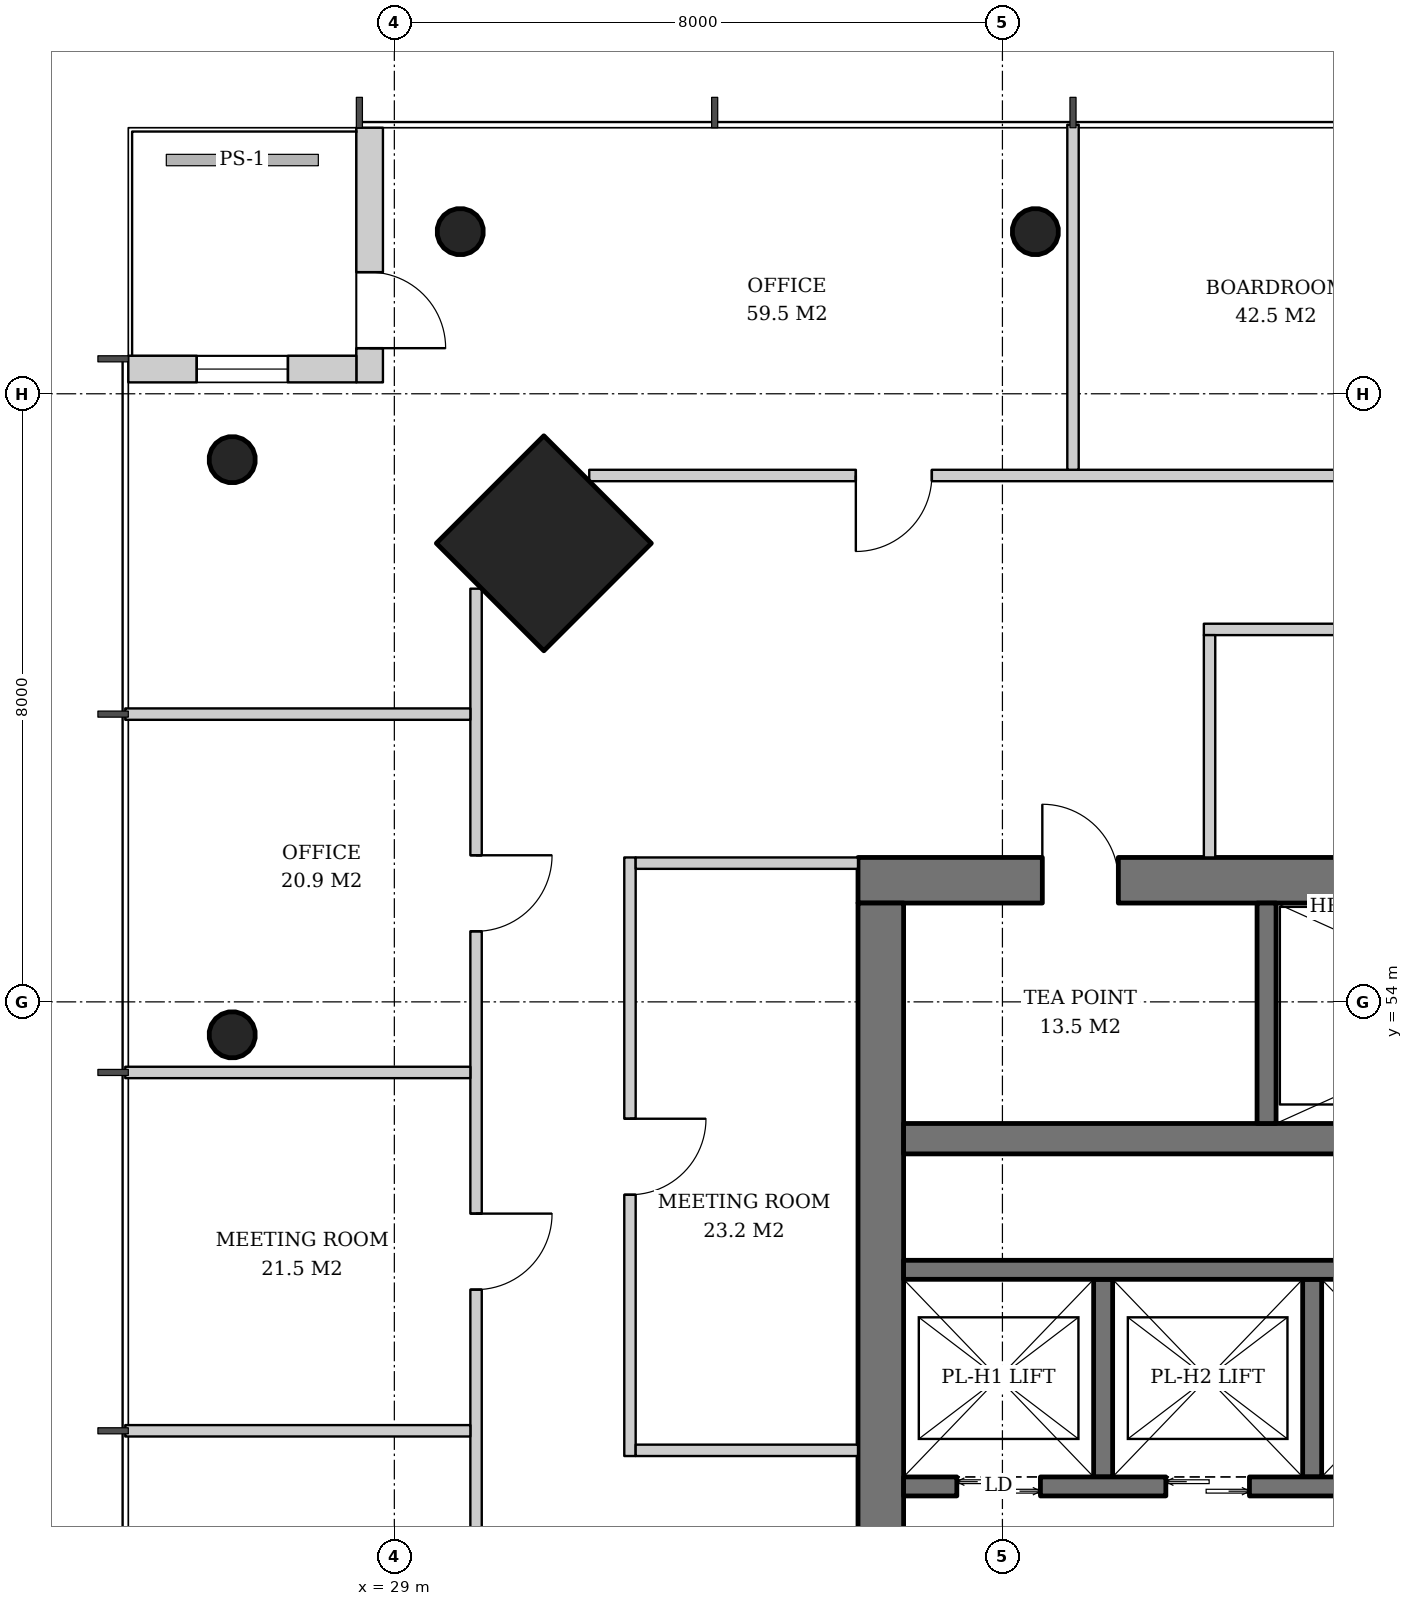
"""IFC4 building model, lengths in metres.
Left out: names, types, materials, properties, quantities, classifications, styles, units other than length and angle.
Written with IfcOpenShell. Run it as: python <this file> out.ifc"""

import sys

from ifc_helpers import new_model, si_unit, direction, frame, frame_2d, origin, origin_2d, place, context, subcontext, project, spatial, rectangle, hollow_circle, extrude, element, fill, save


model = new_model("IFC4")
c1 = context("Model", 3, precision=1e-05, world=origin(), true_north=direction((0.0, 1.0)))
c2 = subcontext(c1, "Body", "Model", "MODEL_VIEW")
j1 = project(units=[si_unit("LENGTHUNIT", "METRE"), si_unit("PLANEANGLEUNIT", "RADIAN")], contexts=[c1])
p1 = place(None, origin())
s1 = spatial("IfcSite", under=j1, at=p1, CompositionType="ELEMENT")
p2 = place(p1, origin())
s2 = spatial("IfcBuilding", under=s1, at=p2, CompositionType="ELEMENT")
p3 = place(p2, frame((0.0, 0.0, 203.4)))
s3 = spatial("IfcBuildingStorey", under=s2, at=p3, CompositionType="ELEMENT", Elevation=203.4)
p4 = place(p3, frame((30.928, 60.072, 0.0), z_axis=(0.031962158256, -0.031962158256, 0.998977898093), x_axis=(0.707106781187, 0.707106781187, 0.0)))
e1 = element("IfcColumn", 1, at=p4, inside=s3, PredefinedType="COLUMN", context=c2, shape_type="SweptSolid", body=[
    extrude(rectangle(XDim=2.0, YDim=2.0, at=origin_2d()), origin(), (0.0, 0.0, 1.0), 3.804),
])
p5 = place(p3, frame((29.829, 64.171, 0.0), z_axis=(0.031898107953, -0.031898107953, 0.998981992539), x_axis=(0.707106781187, 0.707106781187, 0.0)))
e2 = element("IfcColumn", 2, at=p5, inside=s3, PredefinedType="COLUMN", context=c2, shape_type="SweptSolid", body=[
    extrude(hollow_circle(Radius=0.305, WallThickness=0.025, at=origin_2d()), origin(), (0.0, 0.0, 1.0), 3.804),
])
p6 = place(p3, frame((37.414, 64.171, 0.0), z_axis=(0.015987237665, -0.031910269556, 0.999362868496), x_axis=(0.894067115991, 0.447933021895, 0.0)))
e3 = element("IfcColumn", 3, at=p6, inside=s3, PredefinedType="COLUMN", context=c2, shape_type="SweptSolid", body=[
    extrude(hollow_circle(Radius=0.305, WallThickness=0.025, at=origin_2d()), origin(), (0.0, 0.0, 1.0), 3.802),
])
p7 = place(p3, frame((26.829, 61.171, 0.0), z_axis=(0.031898107953, -0.031898107953, 0.998981992539), x_axis=(0.707106781187, 0.707106781187, 0.0)))
e4 = element("IfcColumn", 4, at=p7, inside=s3, PredefinedType="COLUMN", context=c2, shape_type="SweptSolid", body=[
    extrude(hollow_circle(Radius=0.305, WallThickness=0.025, at=origin_2d()), origin(), (0.0, 0.0, 1.0), 3.804),
])
p8 = place(p3, frame((26.829, 53.586, 0.0), z_axis=(0.031910269556, -0.015987237665, 0.999362868496), x_axis=(0.447933021895, 0.894067115991, 0.0)))
e5 = element("IfcColumn", 5, at=p8, inside=s3, PredefinedType="COLUMN", context=c2, shape_type="SweptSolid", body=[
    extrude(hollow_circle(Radius=0.305, WallThickness=0.025, at=origin_2d()), origin(), (0.0, 0.0, 1.0), 3.802),
])
p9 = place(p3, frame((35.1, 55.6, 0.0), z_axis=(0.0, 0.0, 1.0), x_axis=(1.0, 0.0, 0.0)))
e6 = element("IfcWall", 6, at=p9, inside=s3, PredefinedType="SHEAR", context=c2, shape_type="SweptSolid", body=[
    extrude(rectangle(XDim=19.8, YDim=0.6, at=frame_2d((9.9, 0.0))), origin(), (0.0, 0.0, 1.0), 3.8),
])
p10 = place(p9, frame((14.54, 0.0, 0.0)))
e7 = element("IfcOpeningElement", 7, at=p10, cuts=e6, PredefinedType="OPENING", context=c2, shape_type="SweptSolid", body=[
    extrude(rectangle(XDim=1.0, YDim=2.1, at=frame_2d((0.5, 1.05))), frame((0.0, 0.31, 0.0), z_axis=(0.0, -1.0, 0.0), x_axis=(1.0, 0.0, 0.0)), (0.0, 0.0, 1.0), 0.62),
])
p11 = place(p9, frame((2.425, 0.0, 0.0)))
e8 = element("IfcOpeningElement", 8, at=p11, cuts=e6, PredefinedType="OPENING", context=c2, shape_type="SweptSolid", body=[
    extrude(rectangle(XDim=1.0, YDim=2.1, at=frame_2d((0.5, 1.05))), frame((0.0, 0.31, 0.0), z_axis=(0.0, -1.0, 0.0), x_axis=(1.0, 0.0, 0.0)), (0.0, 0.0, 1.0), 0.62),
])
p12 = place(p3, frame((35.4, 36.7, 0.0), z_axis=(0.0, 0.0, 1.0), x_axis=(0.0, 1.0, 0.0)))
e9 = element("IfcWall", 9, at=p12, inside=s3, PredefinedType="SHEAR", context=c2, shape_type="SweptSolid", body=[
    extrude(rectangle(XDim=18.6, YDim=0.6, at=frame_2d((9.3, 0.0))), origin(), (0.0, 0.0, 1.0), 3.8),
])
p13 = place(p12, frame((8.4, 0.0, 0.0)))
e10 = element("IfcOpeningElement", 10, at=p13, cuts=e9, PredefinedType="OPENING", context=c2, shape_type="SweptSolid", body=[
    extrude(rectangle(XDim=1.8, YDim=2.4, at=frame_2d((0.9, 1.2))), frame((0.0, 0.31, 0.0), z_axis=(0.0, -1.0, 0.0), x_axis=(1.0, 0.0, 0.0)), (0.0, 0.0, 1.0), 0.62),
])
p14 = place(p3, frame((35.7, 52.2, 0.0), z_axis=(0.0, 0.0, 1.0), x_axis=(1.0, 0.0, 0.0)))
e11 = element("IfcWall", 11, at=p14, inside=s3, PredefinedType="SHEAR", context=c2, shape_type="SweptSolid", body=[
    extrude(rectangle(XDim=18.6, YDim=0.4, at=frame_2d((9.3, 0.0))), origin(), (0.0, 0.0, 1.0), 3.8),
])
p15 = place(p3, frame((28.675, 65.5, 0.0), z_axis=(0.0, 0.0, 1.0), x_axis=(0.0, -1.0, 0.0)))
e12 = element("IfcWall", 12, at=p15, inside=s3, PredefinedType="SOLIDWALL", context=c2, shape_type="SweptSolid", body=[
    extrude(rectangle(XDim=3.35, YDim=0.35, at=frame_2d((1.675, 0.0))), origin(), (0.0, 0.0, 1.0), 3.62),
])
p16 = place(p15, frame((1.9, 0.0, 0.0)))
e13 = element("IfcOpeningElement", 13, at=p16, cuts=e12, PredefinedType="OPENING", context=c2, shape_type="SweptSolid", body=[
    extrude(rectangle(XDim=1.0, YDim=2.4, at=frame_2d((0.5, 1.2))), frame((0.0, 0.185, 0.0), z_axis=(0.0, -1.0, 0.0), x_axis=(1.0, 0.0, 0.0)), (0.0, 0.0, 1.0), 0.37),
])
p17 = place(p3, frame((28.5, 62.325, 0.0), z_axis=(0.0, 0.0, 1.0), x_axis=(-1.0, 0.0, 0.0)))
e14 = element("IfcWall", 14, at=p17, inside=s3, PredefinedType="SOLIDWALL", context=c2, shape_type="SweptSolid", body=[
    extrude(rectangle(XDim=3.0, YDim=0.35, at=frame_2d((1.5, 0.0))), origin(), (0.0, 0.0, 1.0), 3.62),
])
p18 = place(p17, frame((0.9, 0.0, 0.6)))
e15 = element("IfcOpeningElement", 15, at=p18, cuts=e14, PredefinedType="OPENING", context=c2, shape_type="SweptSolid", body=[
    extrude(rectangle(XDim=1.2, YDim=2.55, at=frame_2d((0.6, 1.275))), frame((0.0, 0.185, 0.0), z_axis=(0.0, -1.0, 0.0), x_axis=(1.0, 0.0, 0.0)), (0.0, 0.0, 1.0), 0.37),
])
p19 = place(p3, frame((40.475, 52.4, 0.0), z_axis=(0.0, 0.0, 1.0), x_axis=(0.0, 1.0, 0.0)))
e16 = element("IfcWall", 16, at=p19, inside=s3, PredefinedType="SHEAR", context=c2, shape_type="SweptSolid", body=[
    extrude(rectangle(XDim=2.9, YDim=0.25, at=frame_2d((1.45, 0.0))), origin(), (0.0, 0.0, 1.0), 3.8),
])
for number, where, z_axis, x_axis in (
    (17, (38.325, 47.75, 0.0), (0.0, 0.0, 1.0), (0.0, 1.0, 0.0)),
    (18, (41.075, 47.75, 0.0), (0.0, 0.0, 1.0), (0.0, 1.0, 0.0)),
):
    element("IfcWall", number, at=place(p3, frame(where, z_axis=z_axis, x_axis=x_axis)), inside=s3, PredefinedType="SHEAR", context=c2, shape_type="SweptSolid", body=[
        extrude(rectangle(XDim=2.6, YDim=0.25, at=frame_2d((1.3, 0.0))), origin(), (0.0, 0.0, 1.0), 3.8),
    ])
p20 = place(p3, frame((35.7, 50.475, 0.0), z_axis=(0.0, 0.0, 1.0), x_axis=(1.0, 0.0, 0.0)))
e19 = element("IfcWall", 19, at=p20, inside=s3, PredefinedType="SHEAR", context=c2, shape_type="SweptSolid", body=[
    extrude(rectangle(XDim=11.0, YDim=0.25, at=frame_2d((5.5, 0.0))), origin(), (0.0, 0.0, 1.0), 3.8),
])
p21 = place(p3, frame((35.7, 47.625, 0.0), z_axis=(0.0, 0.0, 1.0), x_axis=(1.0, 0.0, 0.0)))
e20 = element("IfcWall", 20, at=p21, inside=s3, PredefinedType="SHEAR", context=c2, shape_type="SweptSolid", body=[
    extrude(rectangle(XDim=12.83, YDim=0.25, at=frame_2d((6.415, 0.0))), origin(), (0.0, 0.0, 1.0), 3.8),
])
p22 = place(p21, frame((0.7, 0.0, 0.0)))
e21 = element("IfcOpeningElement", 21, at=p22, cuts=e20, PredefinedType="OPENING", context=c2, shape_type="SweptSolid", body=[
    extrude(rectangle(XDim=1.1, YDim=2.2, at=frame_2d((0.55, 1.1))), frame((0.0, 0.135, 0.0), z_axis=(0.0, -1.0, 0.0), x_axis=(1.0, 0.0, 0.0)), (0.0, 0.0, 1.0), 0.27),
])
p23 = place(p21, frame((3.45, 0.0, 0.0)))
e22 = element("IfcOpeningElement", 22, at=p23, cuts=e20, PredefinedType="OPENING", context=c2, shape_type="SweptSolid", body=[
    extrude(rectangle(XDim=1.1, YDim=2.2, at=frame_2d((0.55, 1.1))), frame((0.0, 0.135, 0.0), z_axis=(0.0, -1.0, 0.0), x_axis=(1.0, 0.0, 0.0)), (0.0, 0.0, 1.0), 0.27),
])
p24 = place(p21, frame((6.2, 0.0, 0.0)))
e23 = element("IfcOpeningElement", 23, at=p24, cuts=e20, PredefinedType="OPENING", context=c2, shape_type="SweptSolid", body=[
    extrude(rectangle(XDim=1.1, YDim=2.2, at=frame_2d((0.55, 1.1))), frame((0.0, 0.135, 0.0), z_axis=(0.0, -1.0, 0.0), x_axis=(1.0, 0.0, 0.0)), (0.0, 0.0, 1.0), 0.27),
])
p25 = place(p21, frame((9.0, 0.0, 0.0)))
e24 = element("IfcOpeningElement", 24, at=p25, cuts=e20, PredefinedType="OPENING", context=c2, shape_type="SweptSolid", body=[
    extrude(rectangle(XDim=1.0, YDim=2.1, at=frame_2d((0.5, 1.05))), frame((0.0, 0.135, 0.0), z_axis=(0.0, -1.0, 0.0), x_axis=(1.0, 0.0, 0.0)), (0.0, 0.0, 1.0), 0.27),
])
p26 = place(p21, frame((11.515, 0.0, 0.0)))
e25 = element("IfcOpeningElement", 25, at=p26, cuts=e20, PredefinedType="OPENING", context=c2, shape_type="SweptSolid", body=[
    extrude(rectangle(XDim=0.8, YDim=2.0, at=frame_2d((0.4, 1.0))), frame((0.0, 0.135, 0.0), z_axis=(0.0, -1.0, 0.0), x_axis=(1.0, 0.0, 0.0)), (0.0, 0.0, 1.0), 0.27),
])
p27 = place(p3, frame((48.515, 58.9, 0.0), z_axis=(0.0, 0.0, 1.0), x_axis=(-1.0, 0.0, 0.0)))
e26 = element("IfcWall", 26, at=p27, inside=s3, PredefinedType="PARTITIONING", context=c2, shape_type="SweptSolid", body=[
    extrude(rectangle(XDim=8.865, YDim=0.15, at=frame_2d((4.433, 0.0))), origin(), (0.0, 0.0, 1.0), 2.867),
])
p28 = place(p27, frame((3.933, 0.0, 0.0)))
e27 = element("IfcOpeningElement", 27, at=p28, cuts=e26, PredefinedType="OPENING", context=c2, shape_type="SweptSolid", body=[
    extrude(rectangle(XDim=1.0, YDim=2.1, at=frame_2d((0.5, 1.05))), frame((0.0, 0.085, 0.0), z_axis=(0.0, -1.0, 0.0), x_axis=(1.0, 0.0, 0.0)), (0.0, 0.0, 1.0), 0.17),
])
p29 = place(p3, frame((39.725, 55.9, 0.0), z_axis=(0.0, 0.0, 1.0), x_axis=(0.0, 1.0, 0.0)))
e28 = element("IfcWall", 28, at=p29, inside=s3, PredefinedType="PARTITIONING", context=c2, shape_type="SweptSolid", body=[
    extrude(rectangle(XDim=2.925, YDim=0.15, at=frame_2d((1.462, 0.0))), origin(), (0.0, 0.0, 1.0), 3.62),
])
p30 = place(p3, frame((32.1, 55.9, 0.0), z_axis=(0.0, 0.0, 1.0), x_axis=(0.0, -1.0, 0.0)))
e29 = element("IfcWall", 29, at=p30, inside=s3, PredefinedType="PARTITIONING", context=c2, shape_type="SweptSolid", body=[
    extrude(rectangle(XDim=7.875, YDim=0.15, at=frame_2d((3.938, 0.0))), origin(), (0.0, 0.0, 1.0), 2.867),
])
p31 = place(p30, frame((3.438, 0.0, 0.0)))
e30 = element("IfcOpeningElement", 30, at=p31, cuts=e29, PredefinedType="OPENING", context=c2, shape_type="SweptSolid", body=[
    extrude(rectangle(XDim=1.0, YDim=2.1, at=frame_2d((0.5, 1.05))), frame((0.0, 0.085, 0.0), z_axis=(0.0, -1.0, 0.0), x_axis=(1.0, 0.0, 0.0)), (0.0, 0.0, 1.0), 0.17),
])
p32 = place(p3, frame((35.1, 55.825, 0.0), z_axis=(0.0, 0.0, 1.0), x_axis=(-1.0, 0.0, 0.0)))
e31 = element("IfcWall", 31, at=p32, inside=s3, PredefinedType="PARTITIONING", context=c2, shape_type="SweptSolid", body=[
    extrude(rectangle(XDim=2.925, YDim=0.15, at=frame_2d((1.462, 0.0))), origin(), (0.0, 0.0, 1.0), 2.867),
])
p33 = place(p3, frame((35.1, 48.1, 0.0), z_axis=(0.0, 0.0, 1.0), x_axis=(-1.0, 0.0, 0.0)))
e32 = element("IfcWall", 32, at=p33, inside=s3, PredefinedType="PARTITIONING", context=c2, shape_type="SweptSolid", body=[
    extrude(rectangle(XDim=2.925, YDim=0.15, at=frame_2d((1.462, 0.0))), origin(), (0.0, 0.0, 1.0), 3.62),
])
p34 = place(p3, frame((58.436, 60.925, 0.0), z_axis=(0.0, 0.0, 1.0), x_axis=(-1.0, 0.0, 0.0)))
e33 = element("IfcWall", 33, at=p34, inside=s3, PredefinedType="PARTITIONING", context=c2, shape_type="SweptSolid", body=[
    extrude(rectangle(XDim=26.872, YDim=0.15, at=frame_2d((13.436, 0.0))), origin(), (0.0, 0.0, 1.0), 2.867),
])
p35 = place(p34, frame((3.507, 0.0, 0.0)))
e34 = element("IfcOpeningElement", 34, at=p35, cuts=e33, PredefinedType="OPENING", context=c2, shape_type="SweptSolid", body=[
    extrude(rectangle(XDim=1.0, YDim=2.1, at=frame_2d((0.5, 1.05))), frame((0.0, 0.085, 0.0), z_axis=(0.0, -1.0, 0.0), x_axis=(1.0, 0.0, 0.0)), (0.0, 0.0, 1.0), 0.17),
])
p36 = place(p34, frame((8.221, 0.0, 0.0)))
e35 = element("IfcOpeningElement", 35, at=p36, cuts=e33, PredefinedType="OPENING", context=c2, shape_type="SweptSolid", body=[
    extrude(rectangle(XDim=1.0, YDim=2.1, at=frame_2d((0.5, 1.05))), frame((0.0, 0.085, 0.0), z_axis=(0.0, -1.0, 0.0), x_axis=(1.0, 0.0, 0.0)), (0.0, 0.0, 1.0), 0.17),
])
p37 = place(p34, frame((12.536, 0.0, 0.0)))
e36 = element("IfcOpeningElement", 36, at=p37, cuts=e33, PredefinedType="OPENING", context=c2, shape_type="SweptSolid", body=[
    extrude(rectangle(XDim=1.8, YDim=2.4, at=frame_2d((0.9, 1.2))), frame((0.0, 0.085, 0.0), z_axis=(0.0, -1.0, 0.0), x_axis=(1.0, 0.0, 0.0)), (0.0, 0.0, 1.0), 0.17),
])
p38 = place(p34, frame((22.364, 0.0, 0.0)))
e37 = element("IfcOpeningElement", 37, at=p38, cuts=e33, PredefinedType="OPENING", context=c2, shape_type="SweptSolid", body=[
    extrude(rectangle(XDim=1.0, YDim=2.1, at=frame_2d((0.5, 1.05))), frame((0.0, 0.085, 0.0), z_axis=(0.0, -1.0, 0.0), x_axis=(1.0, 0.0, 0.0)), (0.0, 0.0, 1.0), 0.17),
])
p39 = place(p3, frame((37.928, 61.0, 0.0), z_axis=(0.0, 0.0, 1.0), x_axis=(0.0, 1.0, 0.0)))
e38 = element("IfcWall", 38, at=p39, inside=s3, PredefinedType="PARTITIONING", context=c2, shape_type="SweptSolid", body=[
    extrude(rectangle(XDim=4.54, YDim=0.15, at=frame_2d((2.27, 0.0))), origin(), (0.0, 0.0, 1.0), 3.12),
])
p40 = place(p3, frame((30.075, 59.436, 0.0), z_axis=(0.0, 0.0, 1.0), x_axis=(0.0, -1.0, 0.0)))
e39 = element("IfcWall", 39, at=p40, inside=s3, PredefinedType="PARTITIONING", context=c2, shape_type="SweptSolid", body=[
    extrude(rectangle(XDim=26.872, YDim=0.15, at=frame_2d((13.436, 0.0))), origin(), (0.0, 0.0, 1.0), 2.867),
])
p41 = place(p40, frame((3.507, 0.0, 0.0)))
e40 = element("IfcOpeningElement", 40, at=p41, cuts=e39, PredefinedType="OPENING", context=c2, shape_type="SweptSolid", body=[
    extrude(rectangle(XDim=1.0, YDim=2.1, at=frame_2d((0.5, 1.05))), frame((0.0, 0.085, 0.0), z_axis=(0.0, -1.0, 0.0), x_axis=(1.0, 0.0, 0.0)), (0.0, 0.0, 1.0), 0.17),
])
p42 = place(p40, frame((8.221, 0.0, 0.0)))
e41 = element("IfcOpeningElement", 41, at=p42, cuts=e39, PredefinedType="OPENING", context=c2, shape_type="SweptSolid", body=[
    extrude(rectangle(XDim=1.0, YDim=2.1, at=frame_2d((0.5, 1.05))), frame((0.0, 0.085, 0.0), z_axis=(0.0, -1.0, 0.0), x_axis=(1.0, 0.0, 0.0)), (0.0, 0.0, 1.0), 0.17),
])
p43 = place(p40, frame((13.036, 0.0, 0.0)))
e42 = element("IfcOpeningElement", 42, at=p43, cuts=e39, PredefinedType="OPENING", context=c2, shape_type="SweptSolid", body=[
    extrude(rectangle(XDim=0.8, YDim=2.1, at=frame_2d((0.4, 1.05))), frame((0.0, 0.085, 0.0), z_axis=(0.0, -1.0, 0.0), x_axis=(1.0, 0.0, 0.0)), (0.0, 0.0, 1.0), 0.17),
])
p44 = place(p40, frame((17.65, 0.0, 0.0)))
e43 = element("IfcOpeningElement", 43, at=p44, cuts=e39, PredefinedType="OPENING", context=c2, shape_type="SweptSolid", body=[
    extrude(rectangle(XDim=1.0, YDim=2.1, at=frame_2d((0.5, 1.05))), frame((0.0, 0.085, 0.0), z_axis=(0.0, -1.0, 0.0), x_axis=(1.0, 0.0, 0.0)), (0.0, 0.0, 1.0), 0.17),
])
p45 = place(p40, frame((22.464, 0.0, 0.0)))
e44 = element("IfcOpeningElement", 44, at=p45, cuts=e39, PredefinedType="OPENING", context=c2, shape_type="SweptSolid", body=[
    extrude(rectangle(XDim=0.8, YDim=2.1, at=frame_2d((0.4, 1.05))), frame((0.0, 0.085, 0.0), z_axis=(0.0, -1.0, 0.0), x_axis=(1.0, 0.0, 0.0)), (0.0, 0.0, 1.0), 0.17),
])
for number, where, z_axis, x_axis in (
    (45, (30.0, 57.786, 0.0), (0.0, 0.0, 1.0), (-1.0, 0.0, 0.0)),
    (46, (30.0, 53.072, 0.0), (0.0, 0.0, 1.0), (-1.0, 0.0, 0.0)),
    (47, (30.0, 48.357, 0.0), (0.0, 0.0, 1.0), (-1.0, 0.0, 0.0)),
):
    element("IfcWall", number, at=place(p3, frame(where, z_axis=z_axis, x_axis=x_axis)), inside=s3, PredefinedType="PARTITIONING", context=c2, shape_type="SweptSolid", body=[
        extrude(rectangle(XDim=4.54, YDim=0.15, at=frame_2d((2.27, 0.0))), origin(), (0.0, 0.0, 1.0), 3.12),
    ])
p46 = place(p16, origin())
e48 = element("IfcDoor", 48, at=p46, inside=s3, OperationType="SINGLE_SWING_RIGHT", PredefinedType="DOOR", context=c2, shape_type="SweptSolid", body=[
    extrude(rectangle(XDim=1.0, YDim=2.4, at=frame_2d((0.5, 1.2))), frame((0.0, 0.025, 0.0), z_axis=(0.0, -1.0, 0.0), x_axis=(1.0, 0.0, 0.0)), (0.0, 0.0, 1.0), 0.05),
])
fill(e13, e48)
p47 = place(p18, origin())
e49 = element("IfcWindow", 49, at=p47, inside=s3, PartitioningType="SINGLE_PANEL", PredefinedType="WINDOW", context=c2, shape_type="SweptSolid", body=[
    extrude(rectangle(XDim=1.2, YDim=2.55, at=frame_2d((0.6, 1.275))), frame((0.0, 0.03, 0.0), z_axis=(0.0, -1.0, 0.0), x_axis=(1.0, 0.0, 0.0)), (0.0, 0.0, 1.0), 0.06),
])
fill(e15, e49)
p48 = place(p22, origin())
e50 = element("IfcDoor", 50, at=p48, inside=s3, OperationType="DOUBLE_DOOR_SLIDING", PredefinedType="DOOR", context=c2, shape_type="SweptSolid", body=[
    extrude(rectangle(XDim=1.1, YDim=2.2, at=frame_2d((0.55, 1.1))), frame((0.0, 0.025, 0.0), z_axis=(0.0, -1.0, 0.0), x_axis=(1.0, 0.0, 0.0)), (0.0, 0.0, 1.0), 0.05),
])
fill(e21, e50)
p49 = place(p23, origin())
e51 = element("IfcDoor", 51, at=p49, inside=s3, OperationType="DOUBLE_DOOR_SLIDING", PredefinedType="DOOR", context=c2, shape_type="SweptSolid", body=[
    extrude(rectangle(XDim=1.1, YDim=2.2, at=frame_2d((0.55, 1.1))), frame((0.0, 0.025, 0.0), z_axis=(0.0, -1.0, 0.0), x_axis=(1.0, 0.0, 0.0)), (0.0, 0.0, 1.0), 0.05),
])
fill(e22, e51)
p50 = place(p11, origin())
e52 = element("IfcDoor", 52, at=p50, inside=s3, OperationType="SINGLE_SWING_LEFT", PredefinedType="DOOR", context=c2, shape_type="SweptSolid", body=[
    extrude(rectangle(XDim=1.0, YDim=2.1, at=frame_2d((0.5, 1.05))), frame((0.0, -0.24, 0.0), z_axis=(0.0, -1.0, 0.0), x_axis=(1.0, 0.0, 0.0)), (0.0, 0.0, 1.0), 0.05),
])
fill(e8, e52)
p51 = place(p31, origin())
e53 = element("IfcDoor", 53, at=p51, inside=s3, OperationType="SINGLE_SWING_LEFT", PredefinedType="DOOR", context=c2, shape_type="SweptSolid", body=[
    extrude(rectangle(XDim=1.0, YDim=2.1, at=frame_2d((0.5, 1.05))), frame((0.0, 0.025, 0.0), z_axis=(0.0, -1.0, 0.0), x_axis=(1.0, 0.0, 0.0)), (0.0, 0.0, 1.0), 0.05),
])
fill(e30, e53)
p52 = place(p38, origin())
e54 = element("IfcDoor", 54, at=p52, inside=s3, OperationType="SINGLE_SWING_RIGHT", PredefinedType="DOOR", context=c2, shape_type="SweptSolid", body=[
    extrude(rectangle(XDim=1.0, YDim=2.1, at=frame_2d((0.5, 1.05))), frame((0.0, 0.025, 0.0), z_axis=(0.0, -1.0, 0.0), x_axis=(1.0, 0.0, 0.0)), (0.0, 0.0, 1.0), 0.05),
])
fill(e37, e54)
p53 = place(p41, origin())
e55 = element("IfcDoor", 55, at=p53, inside=s3, OperationType="SINGLE_SWING_LEFT", PredefinedType="DOOR", context=c2, shape_type="SweptSolid", body=[
    extrude(rectangle(XDim=1.0, YDim=2.1, at=frame_2d((0.5, 1.05))), frame((0.0, 0.025, 0.0), z_axis=(0.0, -1.0, 0.0), x_axis=(1.0, 0.0, 0.0)), (0.0, 0.0, 1.0), 0.05),
])
fill(e40, e55)
p54 = place(p42, origin())
e56 = element("IfcDoor", 56, at=p54, inside=s3, OperationType="SINGLE_SWING_LEFT", PredefinedType="DOOR", context=c2, shape_type="SweptSolid", body=[
    extrude(rectangle(XDim=1.0, YDim=2.1, at=frame_2d((0.5, 1.05))), frame((0.0, 0.025, 0.0), z_axis=(0.0, -1.0, 0.0), x_axis=(1.0, 0.0, 0.0)), (0.0, 0.0, 1.0), 0.05),
])
fill(e41, e56)
save(model, sys.argv[1])
